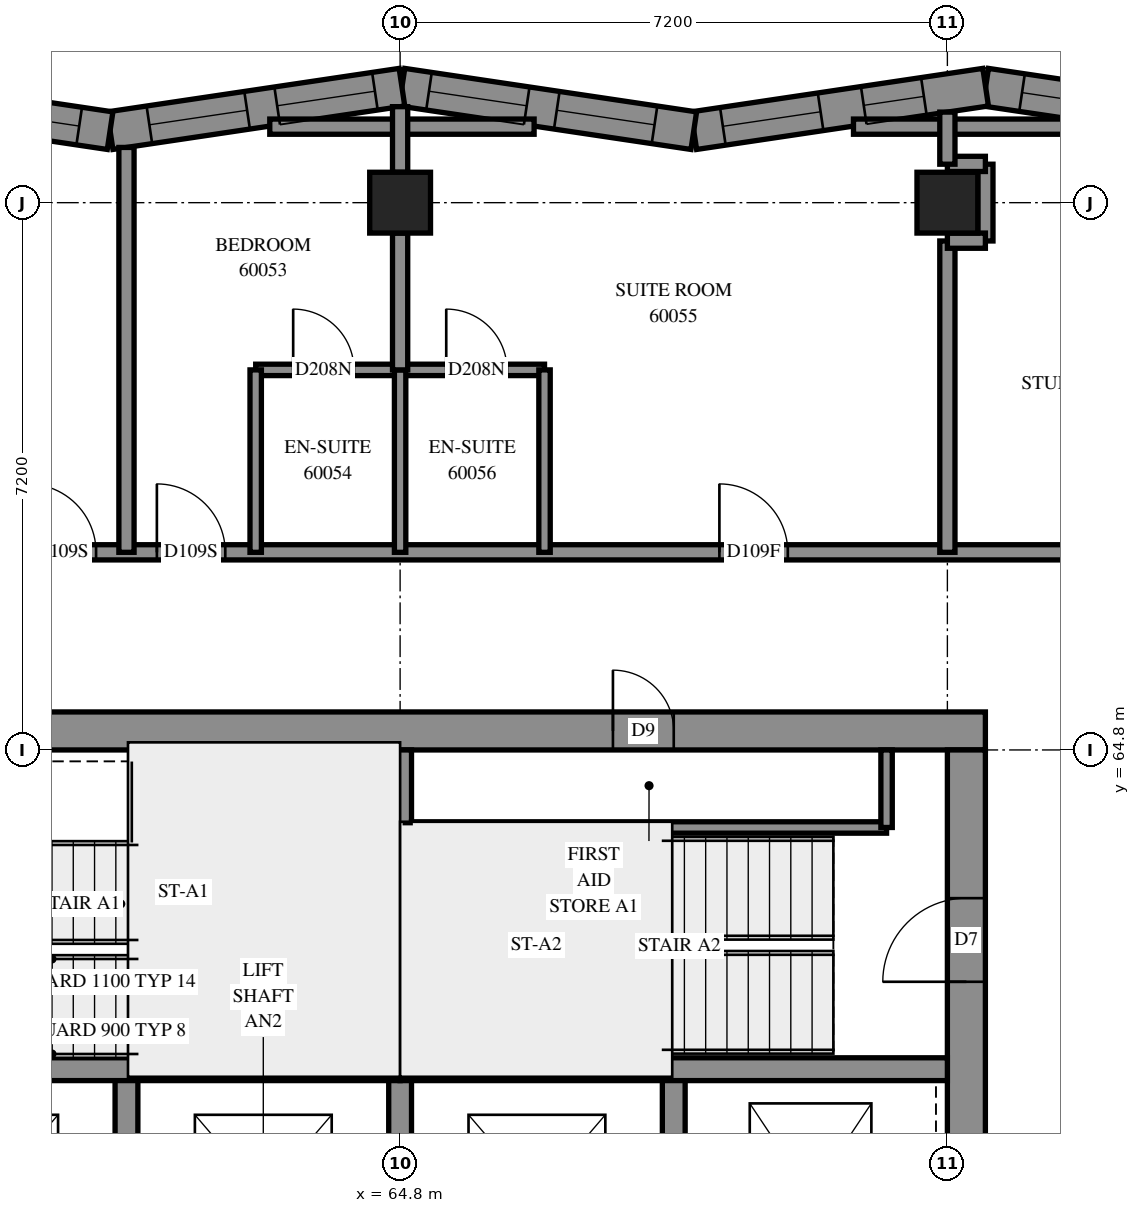
"""IFC4 building model, lengths in metres.
Left out: names, types, materials, properties, quantities, classifications, styles, units other than length and angle.
Written with IfcOpenShell. Run it as: python <this file> out.ifc"""

import sys

from ifc_helpers import new_model, si_unit, direction, frame, frame_2d, origin, origin_2d, place, context, subcontext, project, spatial, polyline, rectangle, outline, extrude, element, fill, save


model = new_model("IFC4")
c1 = context("Model", 3, precision=1e-05, world=origin(), true_north=direction((0.0, 1.0)))
c2 = subcontext(c1, "Body", "Model", "MODEL_VIEW")
j1 = project(units=[si_unit("LENGTHUNIT", "METRE"), si_unit("PLANEANGLEUNIT", "RADIAN")], contexts=[c1])
p1 = place(None, origin())
s1 = spatial("IfcSite", under=j1, at=p1, CompositionType="ELEMENT")
p2 = place(p1, origin())
s2 = spatial("IfcBuilding", under=s1, at=p2, CompositionType="ELEMENT")
p3 = place(p2, frame((0.0, 0.0, 220.2)))
s3 = spatial("IfcBuildingStorey", under=s2, at=p3, CompositionType="ELEMENT", Elevation=220.2)
for number, where, z_axis, x_axis in (
    (1, (64.8, 72.0, 0.0), (0.0, 0.0, 1.0), (1.0, 0.0, 0.0)),
    (2, (72.0, 72.0, 0.0), (0.0, 0.0, 1.0), (1.0, 0.0, 0.0)),
):
    element("IfcColumn", number, at=place(p3, frame(where, z_axis=z_axis, x_axis=x_axis)), inside=s3, PredefinedType="COLUMN", context=c2, shape_type="SweptSolid", body=[
        extrude(rectangle(XDim=0.8, YDim=0.8, at=origin_2d()), origin(), (0.0, 0.0, 1.0), 3.1),
    ])
p4 = place(p3, frame((57.1, 65.05, -0.3), z_axis=(0.0, 0.0, 1.0), x_axis=(1.0, 0.0, 0.0)))
e3 = element("IfcWall", 3, at=p4, inside=s3, PredefinedType="SHEAR", context=c2, shape_type="SweptSolid", body=[
    extrude(rectangle(XDim=15.4, YDim=0.5, at=frame_2d((7.7, 0.0))), origin(), (0.0, 0.0, 1.0), 2.7),
])
p5 = place(p4, frame((10.5, 0.0, 0.3)))
e4 = element("IfcOpeningElement", 4, at=p5, cuts=e3, PredefinedType="OPENING", context=c2, shape_type="SweptSolid", body=[
    extrude(rectangle(XDim=0.8, YDim=2.1, at=frame_2d((0.4, 1.05))), frame((0.0, 0.26, 0.0), z_axis=(0.0, -1.0, 0.0), x_axis=(1.0, 0.0, 0.0)), (0.0, 0.0, 1.0), 0.52),
])
p6 = place(p3, frame((72.25, 50.4, -0.3), z_axis=(0.0, 0.0, 1.0), x_axis=(0.0, 1.0, 0.0)))
e5 = element("IfcWall", 5, at=p6, inside=s3, PredefinedType="SHEAR", context=c2, shape_type="SweptSolid", body=[
    extrude(rectangle(XDim=14.4, YDim=0.5, at=frame_2d((7.2, 0.0))), origin(), (0.0, 0.0, 1.0), 2.7),
])
p7 = place(p6, frame((4.55, 0.0, 0.3)))
e6 = element("IfcOpeningElement", 6, at=p7, cuts=e5, PredefinedType="OPENING", context=c2, shape_type="SweptSolid", body=[
    extrude(rectangle(XDim=1.1, YDim=2.1, at=frame_2d((0.55, 1.05))), frame((0.0, 0.26, 0.0), z_axis=(0.0, -1.0, 0.0), x_axis=(1.0, 0.0, 0.0)), (0.0, 0.0, 1.0), 0.52),
])
p8 = place(p6, frame((11.35, 0.0, 0.3)))
e7 = element("IfcOpeningElement", 7, at=p8, cuts=e5, PredefinedType="OPENING", context=c2, shape_type="SweptSolid", body=[
    extrude(rectangle(XDim=1.1, YDim=2.1, at=frame_2d((0.55, 1.05))), frame((0.0, 0.26, 0.0), z_axis=(0.0, -1.0, 0.0), x_axis=(1.0, 0.0, 0.0)), (0.0, 0.0, 1.0), 0.52),
])
for number, where, z_axis, x_axis in (
    (8, (61.2, 57.3, 0.0), (0.0, 0.0, 1.0), (0.0, 1.0, 0.0)),
    (9, (64.8, 57.3, 0.0), (0.0, 0.0, 1.0), (0.0, 1.0, 0.0)),
    (10, (68.4, 57.3, 0.0), (0.0, 0.0, 1.0), (0.0, 1.0, 0.0)),
):
    element("IfcWall", number, at=place(p3, frame(where, z_axis=z_axis, x_axis=x_axis)), inside=s3, PredefinedType="SOLIDWALL", context=c2, shape_type="SweptSolid", body=[
        extrude(rectangle(XDim=3.3, YDim=0.3, at=frame_2d((1.65, 0.0))), origin(), (0.0, 0.0, 1.0), 3.1),
    ])
for number, where, z_axis, x_axis in (
    (11, (57.6, 60.6, 0.0), (0.0, 0.0, 1.0), (1.0, 0.0, 0.0)),
    (12, (64.8, 60.6, 0.0), (0.0, 0.0, 1.0), (1.0, 0.0, 0.0)),
):
    element("IfcWall", number, at=place(p3, frame(where, z_axis=z_axis, x_axis=x_axis)), inside=s3, PredefinedType="SOLIDWALL", context=c2, shape_type="SweptSolid", body=[
        extrude(rectangle(XDim=7.2, YDim=0.3, at=frame_2d((3.6, 0.0))), origin(), (0.0, 0.0, 1.0), 3.1),
    ])
p9 = place(p3, frame((64.8, 60.6, 0.0), z_axis=(0.0, 0.0, 1.0), x_axis=(0.0, 1.0, 0.0)))
e13 = element("IfcWall", 13, at=p9, inside=s3, PredefinedType="SOLIDWALL", context=c2, shape_type="SweptSolid", body=[
    extrude(rectangle(XDim=4.2, YDim=0.3, at=frame_2d((2.1, 0.0))), origin(), (0.0, 0.0, 1.0), 3.1),
])
p10 = place(p3, frame((76.362, 72.944, 0.0), z_axis=(0.0, 0.0, 1.0), x_axis=(-0.9890858863, 0.1473401149, 0.0)))
e14 = element("IfcWall", 14, at=p10, inside=s3, PredefinedType="SOLIDWALL", context=c2, shape_type="SweptSolid", body=[
    extrude(outline(polyline([(0.056, -0.25), (3.938, -0.25), (3.864, 0.25), (-0.056, 0.25), (0.056, -0.25)])), origin(), (0.0, 0.0, 1.0), 3.1),
])
p11 = place(p10, frame((2.217, 0.0, 0.45)))
e15 = element("IfcOpeningElement", 15, at=p11, cuts=e14, PredefinedType="OPENING", context=c2, shape_type="SweptSolid", body=[
    extrude(rectangle(XDim=1.2, YDim=2.5, at=frame_2d((0.6, 1.25))), frame((0.0, 0.26, 0.0), z_axis=(0.0, -1.0, 0.0), x_axis=(1.0, 0.0, 0.0)), (0.0, 0.0, 1.0), 0.52),
])
p12 = place(p3, frame((72.503, 73.519, 0.0), z_axis=(0.0, 0.0, 1.0), x_axis=(-0.9890847468, -0.1473477641, 0.0)))
e16 = element("IfcWall", 16, at=p12, inside=s3, PredefinedType="SOLIDWALL", context=c2, shape_type="SweptSolid", body=[
    extrude(outline(polyline([(-0.037, -0.25), (3.845, -0.25), (3.919, 0.25), (0.037, 0.25), (-0.037, -0.25)])), origin(), (0.0, 0.0, 1.0), 3.1),
])
p13 = place(p12, frame((2.195, 0.0, 0.45)))
e17 = element("IfcOpeningElement", 17, at=p13, cuts=e16, PredefinedType="OPENING", context=c2, shape_type="SweptSolid", body=[
    extrude(rectangle(XDim=1.3, YDim=2.5, at=frame_2d((0.65, 1.25))), frame((0.0, 0.26, 0.0), z_axis=(0.0, -1.0, 0.0), x_axis=(1.0, 0.0, 0.0)), (0.0, 0.0, 1.0), 0.52),
])
p14 = place(p12, frame((0.822, 0.0, 0.45)))
e18 = element("IfcOpeningElement", 18, at=p14, cuts=e16, PredefinedType="OPENING", context=c2, shape_type="SweptSolid", body=[
    extrude(rectangle(XDim=0.8, YDim=2.5, at=frame_2d((0.4, 1.25))), frame((0.0, 0.26, 0.0), z_axis=(0.0, -1.0, 0.0), x_axis=(1.0, 0.0, 0.0)), (0.0, 0.0, 1.0), 0.52),
])
p15 = place(p3, frame((68.664, 72.947, 0.0), z_axis=(0.0, 0.0, 1.0), x_axis=(-0.9890847468, 0.1473477641, 0.0)))
e19 = element("IfcWall", 19, at=p15, inside=s3, PredefinedType="SOLIDWALL", context=c2, shape_type="SweptSolid", body=[
    extrude(outline(polyline([(0.037, -0.25), (3.919, -0.25), (3.845, 0.25), (-0.037, 0.25), (0.037, -0.25)])), origin(), (0.0, 0.0, 1.0), 3.1),
])
p16 = place(p15, frame((0.522, 0.0, 0.45)))
e20 = element("IfcOpeningElement", 20, at=p16, cuts=e19, PredefinedType="OPENING", context=c2, shape_type="SweptSolid", body=[
    extrude(rectangle(XDim=1.3, YDim=2.5, at=frame_2d((0.65, 1.25))), frame((0.0, 0.26, 0.0), z_axis=(0.0, -1.0, 0.0), x_axis=(1.0, 0.0, 0.0)), (0.0, 0.0, 1.0), 0.52),
])
p17 = place(p15, frame((2.222, 0.0, 0.45)))
e21 = element("IfcOpeningElement", 21, at=p17, cuts=e19, PredefinedType="OPENING", context=c2, shape_type="SweptSolid", body=[
    extrude(rectangle(XDim=1.3, YDim=2.5, at=frame_2d((0.65, 1.25))), frame((0.0, 0.26, 0.0), z_axis=(0.0, -1.0, 0.0), x_axis=(1.0, 0.0, 0.0)), (0.0, 0.0, 1.0), 0.52),
])
p18 = place(p3, frame((64.824, 73.519, 0.0), z_axis=(0.0, 0.0, 1.0), x_axis=(-0.9890847468, -0.1473477641, 0.0)))
e22 = element("IfcWall", 22, at=p18, inside=s3, PredefinedType="SOLIDWALL", context=c2, shape_type="SweptSolid", body=[
    extrude(outline(polyline([(-0.037, -0.25), (3.845, -0.25), (3.919, 0.25), (0.037, 0.25), (-0.037, -0.25)])), origin(), (0.0, 0.0, 1.0), 3.1),
])
p19 = place(p18, frame((0.36, 0.0, 0.45)))
e23 = element("IfcOpeningElement", 23, at=p19, cuts=e22, PredefinedType="OPENING", context=c2, shape_type="SweptSolid", body=[
    extrude(rectangle(XDim=1.3, YDim=2.5, at=frame_2d((0.65, 1.25))), frame((0.0, 0.26, 0.0), z_axis=(0.0, -1.0, 0.0), x_axis=(1.0, 0.0, 0.0)), (0.0, 0.0, 1.0), 0.52),
])
p20 = place(p18, frame((2.06, 0.0, 0.45)))
e24 = element("IfcOpeningElement", 24, at=p20, cuts=e22, PredefinedType="OPENING", context=c2, shape_type="SweptSolid", body=[
    extrude(rectangle(XDim=1.3, YDim=2.5, at=frame_2d((0.65, 1.25))), frame((0.0, 0.26, 0.0), z_axis=(0.0, -1.0, 0.0), x_axis=(1.0, 0.0, 0.0)), (0.0, 0.0, 1.0), 0.52),
])
p21 = place(p3, frame((60.984, 72.947, 0.0), z_axis=(0.0, 0.0, 1.0), x_axis=(-0.9890847468, 0.1473477641, 0.0)))
e25 = element("IfcWall", 25, at=p21, inside=s3, PredefinedType="SOLIDWALL", context=c2, shape_type="SweptSolid", body=[
    extrude(outline(polyline([(0.037, -0.25), (3.919, -0.25), (3.845, 0.25), (-0.037, 0.25), (0.037, -0.25)])), origin(), (0.0, 0.0, 1.0), 3.1),
])
p22 = place(p21, frame((0.411, 0.0, 0.45)))
e26 = element("IfcOpeningElement", 26, at=p22, cuts=e25, PredefinedType="OPENING", context=c2, shape_type="SweptSolid", body=[
    extrude(rectangle(XDim=1.3, YDim=2.5, at=frame_2d((0.65, 1.25))), frame((0.0, 0.26, 0.0), z_axis=(0.0, -1.0, 0.0), x_axis=(1.0, 0.0, 0.0)), (0.0, 0.0, 1.0), 0.52),
])
p23 = place(p21, frame((2.459, 0.0, 0.45)))
e27 = element("IfcOpeningElement", 27, at=p23, cuts=e25, PredefinedType="OPENING", context=c2, shape_type="SweptSolid", body=[
    extrude(rectangle(XDim=0.8, YDim=2.5, at=frame_2d((0.4, 1.25))), frame((0.0, 0.26, 0.0), z_axis=(0.0, -1.0, 0.0), x_axis=(1.0, 0.0, 0.0)), (0.0, 0.0, 1.0), 0.52),
])
p24 = place(p3, frame((64.95, 63.78, 0.0), z_axis=(0.0, 0.0, 1.0), x_axis=(1.0, 0.0, 0.0)))
e28 = element("IfcWall", 28, at=p24, inside=s3, PredefinedType="PARTITIONING", context=c2, shape_type="SweptSolid", body=[
    extrude(rectangle(XDim=6.25, YDim=0.15, at=frame_2d((3.125, 0.0))), origin(), (0.0, 0.0, 1.0), 3.1),
])
p25 = place(p3, frame((71.2, 63.78, 0.0), z_axis=(0.0, 0.0, 1.0), x_axis=(0.0, 1.0, 0.0)))
e29 = element("IfcWall", 29, at=p25, inside=s3, PredefinedType="PARTITIONING", context=c2, shape_type="SweptSolid", body=[
    extrude(rectangle(XDim=1.02, YDim=0.15, at=frame_2d((0.51, 0.0))), origin(), (0.0, 0.0, 1.0), 3.1),
])
p26 = place(p3, frame((55.0, 67.4, 0.0), z_axis=(0.0, 0.0, 1.0), x_axis=(1.0, 0.0, 0.0)))
e30 = element("IfcWall", 30, at=p26, inside=s3, PredefinedType="PARTITIONING", context=c2, shape_type="SweptSolid", body=[
    extrude(rectangle(XDim=19.6, YDim=0.2, at=frame_2d((9.8, 0.0))), origin(), (0.0, 0.0, 1.0), 3.1),
])
p27 = place(p26, frame((4.9, 0.0, 0.0)))
e31 = element("IfcOpeningElement", 31, at=p27, cuts=e30, PredefinedType="OPENING", context=c2, shape_type="SweptSolid", body=[
    extrude(rectangle(XDim=0.9, YDim=2.1, at=frame_2d((0.45, 1.05))), frame((0.0, 0.11, 0.0), z_axis=(0.0, -1.0, 0.0), x_axis=(1.0, 0.0, 0.0)), (0.0, 0.0, 1.0), 0.22),
])
p28 = place(p26, frame((6.6, 0.0, 0.0)))
e32 = element("IfcOpeningElement", 32, at=p28, cuts=e30, PredefinedType="OPENING", context=c2, shape_type="SweptSolid", body=[
    extrude(rectangle(XDim=0.9, YDim=2.1, at=frame_2d((0.45, 1.05))), frame((0.0, 0.11, 0.0), z_axis=(0.0, -1.0, 0.0), x_axis=(1.0, 0.0, 0.0)), (0.0, 0.0, 1.0), 0.22),
])
p29 = place(p26, frame((14.001, 0.0, 0.0)))
e33 = element("IfcOpeningElement", 33, at=p29, cuts=e30, PredefinedType="OPENING", context=c2, shape_type="SweptSolid", body=[
    extrude(rectangle(XDim=0.9, YDim=2.1, at=frame_2d((0.45, 1.05))), frame((0.0, 0.11, 0.0), z_axis=(0.0, -1.0, 0.0), x_axis=(1.0, 0.0, 0.0)), (0.0, 0.0, 1.0), 0.22),
])
p30 = place(p3, frame((61.2, 67.4, 0.0), z_axis=(0.0, 0.0, 1.0), x_axis=(0.0, 1.0, 0.0)))
e34 = element("IfcWall", 34, at=p30, inside=s3, PredefinedType="PARTITIONING", context=c2, shape_type="SweptSolid", body=[
    extrude(rectangle(XDim=5.327, YDim=0.2, at=frame_2d((2.663, 0.0))), origin(), (0.0, 0.0, 1.0), 3.1),
])
p31 = place(p3, frame((72.0, 67.4, 0.0), z_axis=(0.0, 0.0, 1.0), x_axis=(0.0, 1.0, 0.0)))
e35 = element("IfcWall", 35, at=p31, inside=s3, PredefinedType="PARTITIONING", context=c2, shape_type="SweptSolid", body=[
    extrude(rectangle(XDim=4.096, YDim=0.2, at=frame_2d((2.048, 0.0))), origin(), (0.0, 0.0, 1.0), 3.1),
])
p32 = place(p3, frame((62.9, 69.8, 0.0), z_axis=(0.0, 0.0, 1.0), x_axis=(1.0, 0.0, 0.0)))
e36 = element("IfcWall", 36, at=p32, inside=s3, PredefinedType="PARTITIONING", context=c2, shape_type="SweptSolid", body=[
    extrude(rectangle(XDim=3.8, YDim=0.15, at=frame_2d((1.9, 0.0))), origin(), (0.0, 0.0, 1.0), 3.1),
])
p33 = place(p32, frame((0.493, 0.0, 0.0)))
e37 = element("IfcOpeningElement", 37, at=p33, cuts=e36, PredefinedType="OPENING", context=c2, shape_type="SweptSolid", body=[
    extrude(rectangle(XDim=0.8, YDim=2.1, at=frame_2d((0.4, 1.05))), frame((0.0, 0.085, 0.0), z_axis=(0.0, -1.0, 0.0), x_axis=(1.0, 0.0, 0.0)), (0.0, 0.0, 1.0), 0.17),
])
p34 = place(p32, frame((2.507, 0.0, 0.0)))
e38 = element("IfcOpeningElement", 38, at=p34, cuts=e36, PredefinedType="OPENING", context=c2, shape_type="SweptSolid", body=[
    extrude(rectangle(XDim=0.8, YDim=2.1, at=frame_2d((0.4, 1.05))), frame((0.0, 0.085, 0.0), z_axis=(0.0, -1.0, 0.0), x_axis=(1.0, 0.0, 0.0)), (0.0, 0.0, 1.0), 0.17),
])
for number, where, z_axis, x_axis in (
    (39, (70.764, 73.0, 0.0), (0.0, 0.0, 1.0), (1.0, 0.0, 0.0)),
    (40, (63.085, 73.0, 0.0), (0.0, 0.0, 1.0), (1.0, 0.0, 0.0)),
):
    element("IfcWall", number, at=place(p3, frame(where, z_axis=z_axis, x_axis=x_axis)), inside=s3, PredefinedType="PARTITIONING", context=c2, shape_type="SweptSolid", body=[
        extrude(rectangle(XDim=3.478, YDim=0.2, at=frame_2d((1.739, 0.0))), origin(), (0.0, 0.0, 1.0), 3.1),
    ])
for number, where, z_axis, x_axis in (
    (41, (62.9, 67.4, 0.0), (0.0, 0.0, 1.0), (0.0, 1.0, 0.0)),
    (42, (64.8, 67.4, 0.0), (0.0, 0.0, 1.0), (0.0, 1.0, 0.0)),
    (43, (66.7, 67.4, 0.0), (0.0, 0.0, 1.0), (0.0, 1.0, 0.0)),
):
    element("IfcWall", number, at=place(p3, frame(where, z_axis=z_axis, x_axis=x_axis)), inside=s3, PredefinedType="PARTITIONING", context=c2, shape_type="SweptSolid", body=[
        extrude(rectangle(XDim=2.4, YDim=0.15, at=frame_2d((1.2, 0.0))), origin(), (0.0, 0.0, 1.0), 3.1),
    ])
p35 = place(p3, frame((64.8, 69.8, 0.0), z_axis=(0.0, 0.0, 1.0), x_axis=(0.0, 1.0, 0.0)))
e44 = element("IfcWall", 44, at=p35, inside=s3, PredefinedType="PARTITIONING", context=c2, shape_type="SweptSolid", body=[
    extrude(rectangle(XDim=1.8, YDim=0.2, at=frame_2d((0.9, 0.0))), origin(), (0.0, 0.0, 1.0), 3.1),
])
p36 = place(p3, frame((72.5, 71.496, 0.0), z_axis=(0.0, 0.0, 1.0), x_axis=(0.0, 1.0, 0.0)))
e45 = element("IfcWall", 45, at=p36, inside=s3, PredefinedType="PARTITIONING", context=c2, shape_type="SweptSolid", body=[
    extrude(rectangle(XDim=1.01, YDim=0.2, at=frame_2d((0.505, 0.0))), origin(), (0.0, 0.0, 1.0), 3.1),
])
p37 = place(p3, frame((64.8, 72.4, 0.0), z_axis=(0.0, 0.0, 1.0), x_axis=(0.0, 1.0, 0.0)))
e46 = element("IfcWall", 46, at=p37, inside=s3, PredefinedType="PARTITIONING", context=c2, shape_type="SweptSolid", body=[
    extrude(rectangle(XDim=0.863, YDim=0.2, at=frame_2d((0.431, 0.0))), origin(), (0.0, 0.0, 1.0), 3.1),
])
for number, where, z_axis, x_axis in (
    (47, (72.0, 71.5, 0.0), (0.0, 0.0, 1.0), (1.0, 0.0, 0.0)),
    (48, (72.0, 72.51, 0.0), (0.0, 0.0, 1.0), (1.0, 0.0, 0.0)),
):
    element("IfcWall", number, at=place(p3, frame(where, z_axis=z_axis, x_axis=x_axis)), inside=s3, PredefinedType="PARTITIONING", context=c2, shape_type="SweptSolid", body=[
        extrude(rectangle(XDim=0.5, YDim=0.2, at=frame_2d((0.25, 0.0))), origin(), (0.0, 0.0, 1.0), 3.1),
    ])
p38 = place(p3, frame((72.0, 72.506, 0.0), z_axis=(0.0, 0.0, 1.0), x_axis=(0.0, 1.0, 0.0)))
e49 = element("IfcWall", 49, at=p38, inside=s3, PredefinedType="PARTITIONING", context=c2, shape_type="SweptSolid", body=[
    extrude(rectangle(XDim=0.685, YDim=0.2, at=frame_2d((0.343, 0.0))), origin(), (0.0, 0.0, 1.0), 3.1),
])
p39 = place(p11, origin())
e50 = element("IfcWindow", 50, at=p39, inside=s3, PartitioningType="SINGLE_PANEL", PredefinedType="WINDOW", context=c2, shape_type="SweptSolid", body=[
    extrude(rectangle(XDim=1.2, YDim=2.5, at=frame_2d((0.6, 1.25))), frame((0.0, 0.14, 0.0), z_axis=(0.0, -1.0, 0.0), x_axis=(1.0, 0.0, 0.0)), (0.0, 0.0, 1.0), 0.06),
])
fill(e15, e50)
p40 = place(p13, origin())
e51 = element("IfcWindow", 51, at=p40, inside=s3, PartitioningType="SINGLE_PANEL", PredefinedType="WINDOW", context=c2, shape_type="SweptSolid", body=[
    extrude(rectangle(XDim=1.3, YDim=2.5, at=frame_2d((0.65, 1.25))), frame((0.0, 0.18, 0.0), z_axis=(0.0, -1.0, 0.0), x_axis=(1.0, 0.0, 0.0)), (0.0, 0.0, 1.0), 0.06),
])
fill(e17, e51)
p41 = place(p16, origin())
e52 = element("IfcWindow", 52, at=p41, inside=s3, PartitioningType="SINGLE_PANEL", PredefinedType="WINDOW", context=c2, shape_type="SweptSolid", body=[
    extrude(rectangle(XDim=1.3, YDim=2.5, at=frame_2d((0.65, 1.25))), frame((0.0, 0.18, 0.0), z_axis=(0.0, -1.0, 0.0), x_axis=(1.0, 0.0, 0.0)), (0.0, 0.0, 1.0), 0.06),
])
fill(e20, e52)
p42 = place(p17, origin())
e53 = element("IfcWindow", 53, at=p42, inside=s3, PartitioningType="SINGLE_PANEL", PredefinedType="WINDOW", context=c2, shape_type="SweptSolid", body=[
    extrude(rectangle(XDim=1.3, YDim=2.5, at=frame_2d((0.65, 1.25))), frame((0.0, 0.14, 0.0), z_axis=(0.0, -1.0, 0.0), x_axis=(1.0, 0.0, 0.0)), (0.0, 0.0, 1.0), 0.06),
])
fill(e21, e53)
p43 = place(p19, origin())
e54 = element("IfcWindow", 54, at=p43, inside=s3, PartitioningType="SINGLE_PANEL", PredefinedType="WINDOW", context=c2, shape_type="SweptSolid", body=[
    extrude(rectangle(XDim=1.3, YDim=2.5, at=frame_2d((0.65, 1.25))), frame((0.0, 0.14, 0.0), z_axis=(0.0, -1.0, 0.0), x_axis=(1.0, 0.0, 0.0)), (0.0, 0.0, 1.0), 0.06),
])
fill(e23, e54)
p44 = place(p20, origin())
e55 = element("IfcWindow", 55, at=p44, inside=s3, PartitioningType="SINGLE_PANEL", PredefinedType="WINDOW", context=c2, shape_type="SweptSolid", body=[
    extrude(rectangle(XDim=1.3, YDim=2.5, at=frame_2d((0.65, 1.25))), frame((0.0, 0.18, 0.0), z_axis=(0.0, -1.0, 0.0), x_axis=(1.0, 0.0, 0.0)), (0.0, 0.0, 1.0), 0.06),
])
fill(e24, e55)
p45 = place(p22, origin())
e56 = element("IfcWindow", 56, at=p45, inside=s3, PartitioningType="SINGLE_PANEL", PredefinedType="WINDOW", context=c2, shape_type="SweptSolid", body=[
    extrude(rectangle(XDim=1.3, YDim=2.5, at=frame_2d((0.65, 1.25))), frame((0.0, 0.18, 0.0), z_axis=(0.0, -1.0, 0.0), x_axis=(1.0, 0.0, 0.0)), (0.0, 0.0, 1.0), 0.06),
])
fill(e26, e56)
p46 = place(p5, origin())
e57 = element("IfcDoor", 57, at=p46, inside=s3, OperationType="SINGLE_SWING_RIGHT", PredefinedType="DOOR", context=c2, shape_type="SweptSolid", body=[
    extrude(rectangle(XDim=0.8, YDim=2.1, at=frame_2d((0.4, 1.05))), frame((0.0, 0.025, 0.0), z_axis=(0.0, -1.0, 0.0), x_axis=(1.0, 0.0, 0.0)), (0.0, 0.0, 1.0), 0.05),
])
fill(e4, e57)
p47 = place(p8, origin())
e58 = element("IfcDoor", 58, at=p47, inside=s3, OperationType="SINGLE_SWING_RIGHT", PredefinedType="DOOR", context=c2, shape_type="SweptSolid", body=[
    extrude(rectangle(XDim=1.1, YDim=2.1, at=frame_2d((0.55, 1.05))), frame((0.0, 0.025, 0.0), z_axis=(0.0, -1.0, 0.0), x_axis=(1.0, 0.0, 0.0)), (0.0, 0.0, 1.0), 0.05),
])
fill(e7, e58)
p48 = place(p27, origin())
e59 = element("IfcDoor", 59, at=p48, inside=s3, OperationType="SINGLE_SWING_RIGHT", PredefinedType="DOOR", context=c2, shape_type="SweptSolid", body=[
    extrude(rectangle(XDim=0.9, YDim=2.1, at=frame_2d((0.45, 1.05))), frame((0.0, 0.025, 0.0), z_axis=(0.0, -1.0, 0.0), x_axis=(1.0, 0.0, 0.0)), (0.0, 0.0, 1.0), 0.05),
])
fill(e31, e59)
p49 = place(p28, origin())
e60 = element("IfcDoor", 60, at=p49, inside=s3, OperationType="SINGLE_SWING_LEFT", PredefinedType="DOOR", context=c2, shape_type="SweptSolid", body=[
    extrude(rectangle(XDim=0.9, YDim=2.1, at=frame_2d((0.45, 1.05))), frame((0.0, 0.025, 0.0), z_axis=(0.0, -1.0, 0.0), x_axis=(1.0, 0.0, 0.0)), (0.0, 0.0, 1.0), 0.05),
])
fill(e32, e60)
p50 = place(p33, origin())
e61 = element("IfcDoor", 61, at=p50, inside=s3, OperationType="SINGLE_SWING_RIGHT", PredefinedType="DOOR", context=c2, shape_type="SweptSolid", body=[
    extrude(rectangle(XDim=0.8, YDim=2.1, at=frame_2d((0.4, 1.05))), frame((0.0, 0.025, 0.0), z_axis=(0.0, -1.0, 0.0), x_axis=(1.0, 0.0, 0.0)), (0.0, 0.0, 1.0), 0.05),
])
fill(e37, e61)
p51 = place(p29, origin())
e62 = element("IfcDoor", 62, at=p51, inside=s3, OperationType="SINGLE_SWING_RIGHT", PredefinedType="DOOR", context=c2, shape_type="SweptSolid", body=[
    extrude(rectangle(XDim=0.9, YDim=2.1, at=frame_2d((0.45, 1.05))), frame((0.0, 0.025, 0.0), z_axis=(0.0, -1.0, 0.0), x_axis=(1.0, 0.0, 0.0)), (0.0, 0.0, 1.0), 0.05),
])
fill(e33, e62)
p52 = place(p34, origin())
e63 = element("IfcDoor", 63, at=p52, inside=s3, OperationType="SINGLE_SWING_RIGHT", PredefinedType="DOOR", context=c2, shape_type="SweptSolid", body=[
    extrude(rectangle(XDim=0.8, YDim=2.1, at=frame_2d((0.4, 1.05))), frame((0.0, 0.025, 0.0), z_axis=(0.0, -1.0, 0.0), x_axis=(1.0, 0.0, 0.0)), (0.0, 0.0, 1.0), 0.05),
])
fill(e38, e63)
p53 = place(p14, origin())
e64 = element("IfcWindow", 64, at=p53, inside=s3, PartitioningType="SINGLE_PANEL", PredefinedType="WINDOW", context=c2, shape_type="SweptSolid", body=[
    extrude(rectangle(XDim=0.8, YDim=2.5, at=frame_2d((0.4, 1.25))), frame((0.0, 0.12, 0.0), z_axis=(0.0, -1.0, 0.0), x_axis=(1.0, 0.0, 0.0)), (0.0, 0.0, 1.0), 0.06),
])
fill(e18, e64)
save(model, sys.argv[1])
